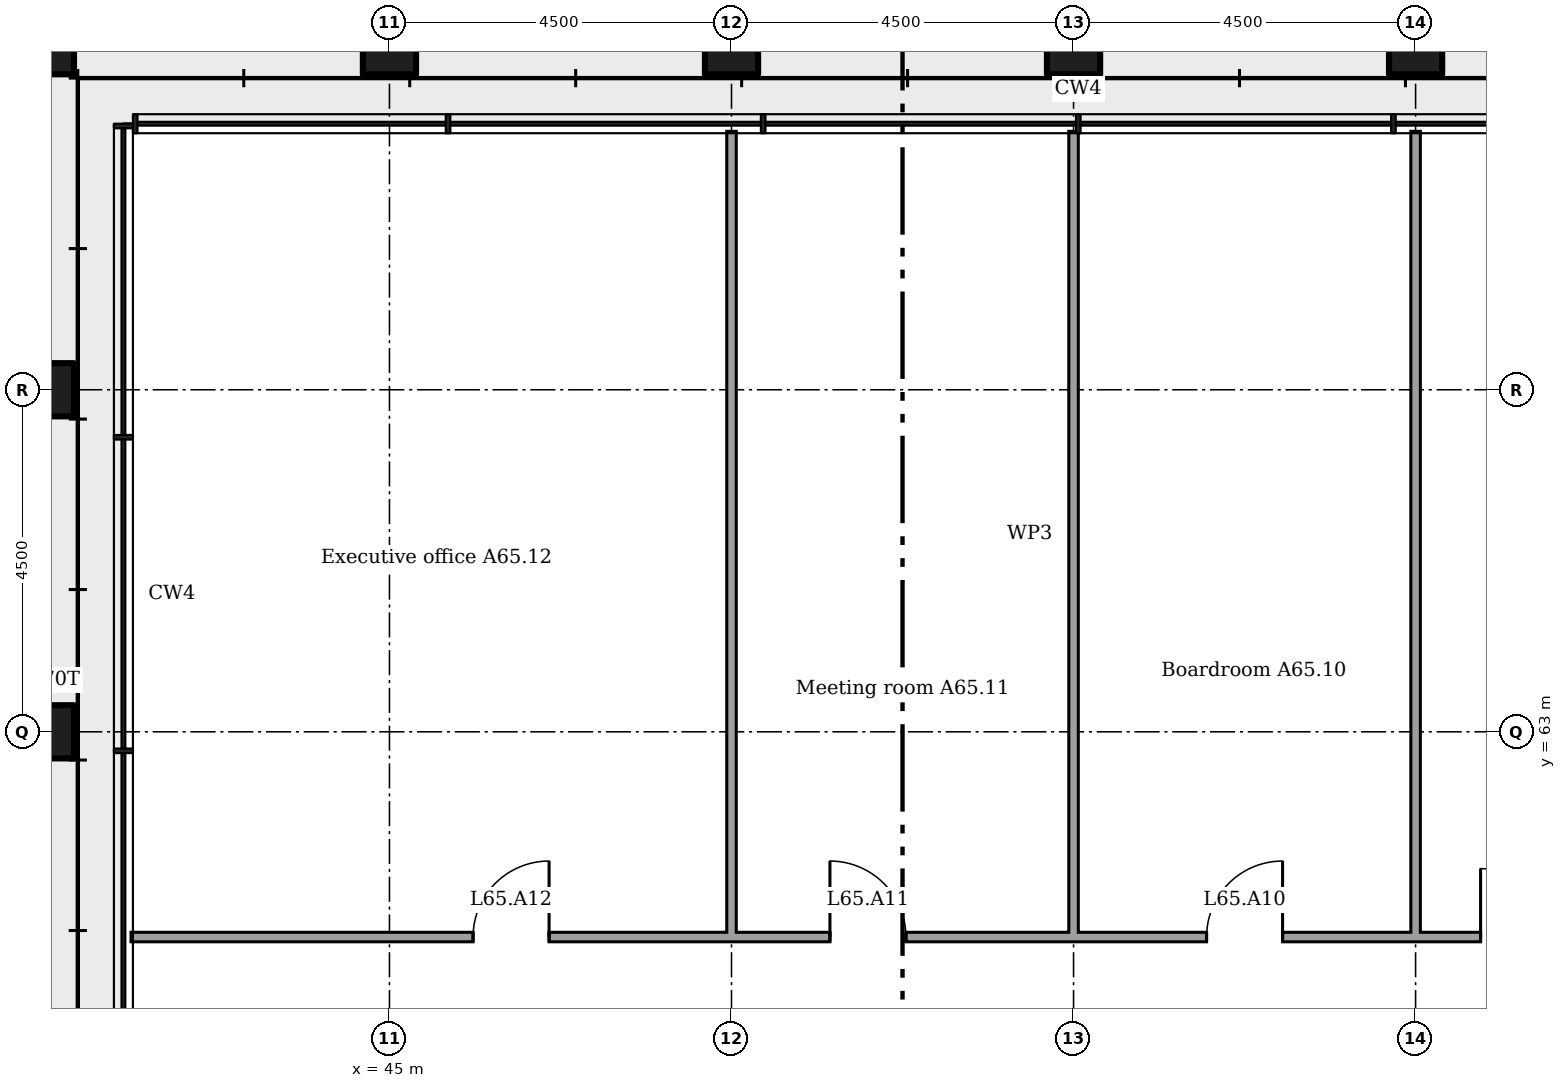
"""IFC4 building model, lengths in metres.
Left out: names, types, materials, properties, quantities, classifications, styles, units other than length and angle.
Written with IfcOpenShell. Run it as: python <this file> out.ifc"""

import sys

from ifc_helpers import new_model, si_unit, direction, frame, frame_2d, origin, origin_2d, place, context, subcontext, project, spatial, rectangle, extrude, element, fill, save


model = new_model("IFC4")
c1 = context("Model", 3, precision=1e-05, world=origin(), true_north=direction((0.0, 1.0)))
c2 = subcontext(c1, "Body", "Model", "MODEL_VIEW")
j1 = project(units=[si_unit("LENGTHUNIT", "METRE"), si_unit("PLANEANGLEUNIT", "RADIAN")], contexts=[c1])
p1 = place(None, origin())
s1 = spatial("IfcSite", under=j1, at=p1, CompositionType="ELEMENT")
p2 = place(p1, origin())
s2 = spatial("IfcBuilding", under=s1, at=p2, CompositionType="ELEMENT")
p3 = place(p2, frame((0.0, 0.0, 255.2)))
s3 = spatial("IfcBuildingStorey", under=s2, at=p3, CompositionType="ELEMENT", Elevation=255.2)
for number, where in (
    (1, (58.5, 72.0, 0.0)),
    (2, (54.0, 72.0, 0.0)),
    (3, (49.5, 72.0, 0.0)),
    (4, (45.0, 72.0, 0.0)),
    (5, (40.5, 72.0, 0.0)),
    (6, (40.5, 67.5, 0.0)),
    (7, (40.5, 63.0, 0.0)),
):
    element("IfcColumn", number, at=place(p3, frame(where)), inside=s3, PredefinedType="COLUMN", context=c2, shape_type="SweptSolid", body=[
        extrude(rectangle(XDim=0.7, YDim=0.7, at=origin_2d()), origin(), (0.0, 0.0, 1.0), 4.2),
    ])
p4 = place(p3, frame((41.6, 60.3, 0.0)))
e8 = element("IfcWall", 8, at=p4, inside=s3, PredefinedType="PARTITIONING", context=c2, shape_type="SweptSolid", body=[
    extrude(rectangle(XDim=20.262, YDim=0.125, at=frame_2d((10.131, 0.0))), origin(), (0.0, 0.0, 1.0), 4.025),
])
p5 = place(p4, frame((17.755, 0.0, 0.0)))
e9 = element("IfcOpeningElement", 9, at=p5, cuts=e8, PredefinedType="OPENING", context=c2, shape_type="SweptSolid", body=[
    extrude(rectangle(XDim=1.8, YDim=2.1, at=frame_2d((0.9, 1.05))), frame((0.0, 0.073, 0.0), z_axis=(0.0, -1.0, 0.0), x_axis=(1.0, 0.0, 0.0)), (0.0, 0.0, 1.0), 0.145),
])
p6 = place(p4, frame((14.15, 0.0, 0.0)))
e10 = element("IfcOpeningElement", 10, at=p6, cuts=e8, PredefinedType="OPENING", context=c2, shape_type="SweptSolid", body=[
    extrude(rectangle(XDim=1.0, YDim=2.1, at=frame_2d((0.5, 1.05))), frame((0.0, 0.073, 0.0), z_axis=(0.0, -1.0, 0.0), x_axis=(1.0, 0.0, 0.0)), (0.0, 0.0, 1.0), 0.145),
])
p7 = place(p4, frame((9.195, 0.0, 0.0)))
e11 = element("IfcOpeningElement", 11, at=p7, cuts=e8, PredefinedType="OPENING", context=c2, shape_type="SweptSolid", body=[
    extrude(rectangle(XDim=1.0, YDim=2.1, at=frame_2d((0.5, 1.05))), frame((0.0, 0.073, 0.0), z_axis=(0.0, -1.0, 0.0), x_axis=(1.0, 0.0, 0.0)), (0.0, 0.0, 1.0), 0.145),
])
p8 = place(p4, frame((4.5, 0.0, 0.0)))
e12 = element("IfcOpeningElement", 12, at=p8, cuts=e8, PredefinedType="OPENING", context=c2, shape_type="SweptSolid", body=[
    extrude(rectangle(XDim=1.0, YDim=2.1, at=frame_2d((0.5, 1.05))), frame((0.0, 0.073, 0.0), z_axis=(0.0, -1.0, 0.0), x_axis=(1.0, 0.0, 0.0)), (0.0, 0.0, 1.0), 0.145),
])
p9 = place(p3, frame((49.5, 60.3, 0.0), z_axis=(0.0, 0.0, 1.0), x_axis=(0.0, 1.0, 0.0)))
e13 = element("IfcWall", 13, at=p9, inside=s3, PredefinedType="PARTITIONING", context=c2, shape_type="SweptSolid", body=[
    extrude(rectangle(XDim=10.6, YDim=0.125, at=frame_2d((5.3, 0.0))), origin(), (0.0, 0.0, 1.0), 3.341),
])
p10 = place(p3, frame((54.0, 60.3, 0.0), z_axis=(0.0, 0.0, 1.0), x_axis=(0.0, 1.0, 0.0)))
e14 = element("IfcWall", 14, at=p10, inside=s3, PredefinedType="MOVABLE", context=c2, shape_type="SweptSolid", body=[
    extrude(rectangle(XDim=10.6, YDim=0.125, at=frame_2d((5.3, 0.0))), origin(), (0.0, 0.0, 1.0), 3.341),
])
p11 = place(p3, frame((58.5, 60.3, 0.0), z_axis=(0.0, 0.0, 1.0), x_axis=(0.0, 1.0, 0.0)))
e15 = element("IfcWall", 15, at=p11, inside=s3, PredefinedType="PARTITIONING", context=c2, shape_type="SweptSolid", body=[
    extrude(rectangle(XDim=10.6, YDim=0.125, at=frame_2d((5.3, 0.0))), origin(), (0.0, 0.0, 1.0), 3.341),
])
p12 = place(p5, origin())
e16 = element("IfcDoor", 16, at=p12, inside=s3, OperationType="DOUBLE_DOOR_SINGLE_SWING", PredefinedType="DOOR", context=c2, shape_type="SweptSolid", body=[
    extrude(rectangle(XDim=1.8, YDim=2.1, at=frame_2d((0.9, 1.05))), frame((0.0, 0.025, 0.0), z_axis=(0.0, -1.0, 0.0), x_axis=(1.0, 0.0, 0.0)), (0.0, 0.0, 1.0), 0.05),
])
fill(e9, e16)
p13 = place(p6, origin())
e17 = element("IfcDoor", 17, at=p13, inside=s3, OperationType="SINGLE_SWING_LEFT", PredefinedType="DOOR", context=c2, shape_type="SweptSolid", body=[
    extrude(rectangle(XDim=1.0, YDim=2.1, at=frame_2d((0.5, 1.05))), frame((0.0, 0.025, 0.0), z_axis=(0.0, -1.0, 0.0), x_axis=(1.0, 0.0, 0.0)), (0.0, 0.0, 1.0), 0.05),
])
fill(e10, e17)
p14 = place(p7, origin())
e18 = element("IfcDoor", 18, at=p14, inside=s3, OperationType="SINGLE_SWING_RIGHT", PredefinedType="DOOR", context=c2, shape_type="SweptSolid", body=[
    extrude(rectangle(XDim=1.0, YDim=2.1, at=frame_2d((0.5, 1.05))), frame((0.0, 0.025, 0.0), z_axis=(0.0, -1.0, 0.0), x_axis=(1.0, 0.0, 0.0)), (0.0, 0.0, 1.0), 0.05),
])
fill(e11, e18)
p15 = place(p8, origin())
e19 = element("IfcDoor", 19, at=p15, inside=s3, OperationType="SINGLE_SWING_LEFT", PredefinedType="DOOR", context=c2, shape_type="SweptSolid", body=[
    extrude(rectangle(XDim=1.0, YDim=2.1, at=frame_2d((0.5, 1.05))), frame((0.0, 0.025, 0.0), z_axis=(0.0, -1.0, 0.0), x_axis=(1.0, 0.0, 0.0)), (0.0, 0.0, 1.0), 0.05),
])
fill(e12, e19)
save(model, sys.argv[1])
